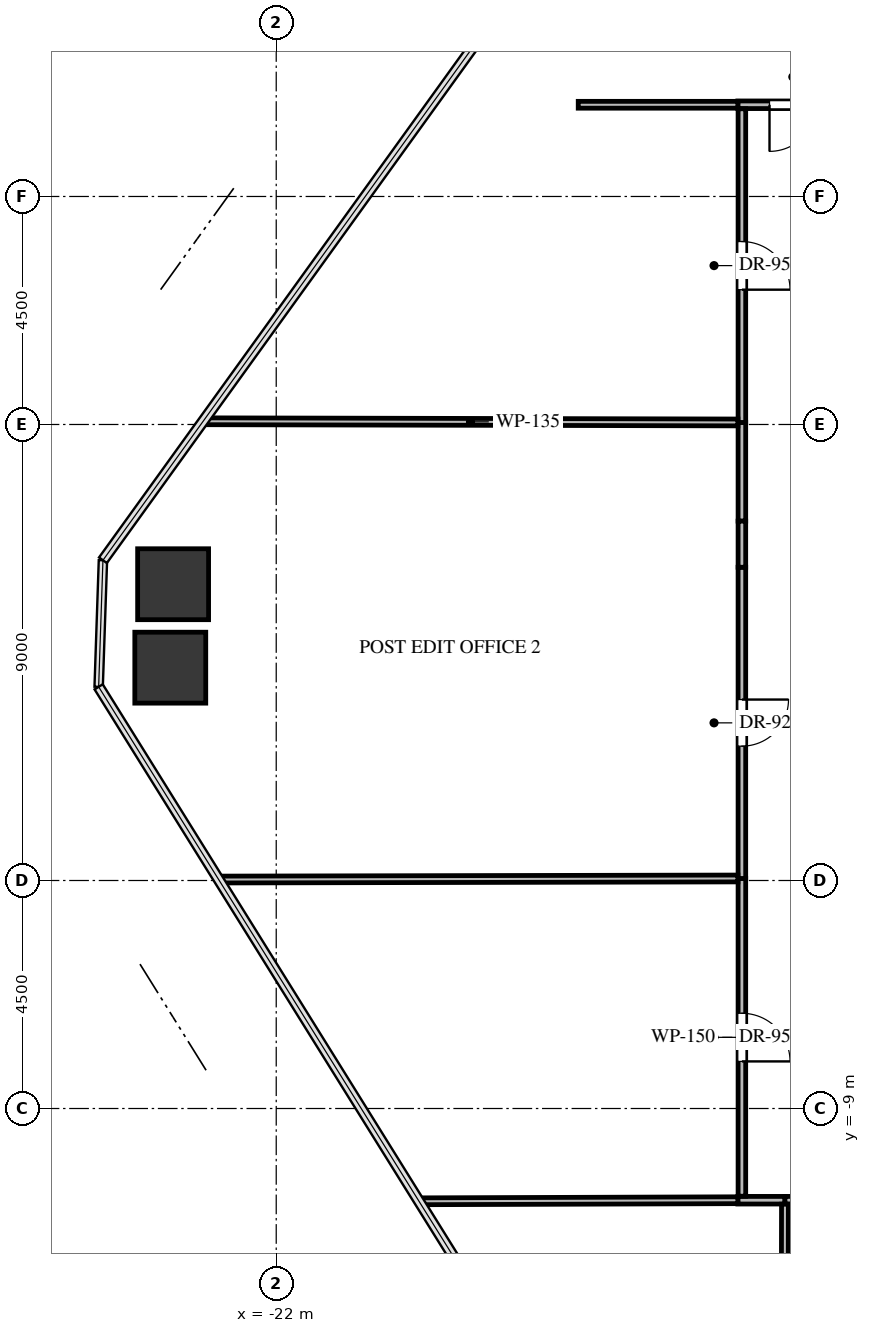
"""IFC4 building model, lengths in metres.
Left out: names, types, materials, properties, quantities, classifications, styles, units other than length and angle.
Written with IfcOpenShell. Run it as: python <this file> out.ifc"""

import sys

from ifc_helpers import new_model, si_unit, direction, frame, frame_2d, origin, origin_2d, place, context, subcontext, project, spatial, rectangle, extrude, source, transform, mapped, element, fill, save


model = new_model("IFC4")
c1 = context("Model", 3, precision=1e-05, world=origin(), true_north=direction((0.0, 1.0)))
c2 = subcontext(c1, "Body", "Model", "MODEL_VIEW")
j1 = project(units=[si_unit("LENGTHUNIT", "METRE"), si_unit("PLANEANGLEUNIT", "RADIAN")], contexts=[c1])
p1 = place(None, origin())
s1 = spatial("IfcSite", under=j1, at=p1, CompositionType="ELEMENT")
p2 = place(p1, origin())
s2 = spatial("IfcBuilding", under=s1, at=p2, CompositionType="ELEMENT")
p3 = place(p2, frame((0.0, 0.0, 72.0)))
s3 = spatial("IfcBuildingStorey", under=s2, at=p3, CompositionType="ELEMENT", Elevation=72.0)
m1 = source(origin(), c2, "Body", "SweptSolid", [
    extrude(rectangle(XDim=1.4, YDim=1.4, at=origin_2d()), origin(), (0.0, 0.0, 1.0), 3.3),
])
for number, where, z_axis, x_axis in (
    (1, (-24.091, -0.3, -0.24), (0.0, 0.0, 1.0), (1.0, 0.0, 0.0)),
    (2, (-24.035, 1.347, -0.24), (0.0, 0.0, 1.0), (1.0, 0.0, 0.0)),
):
    element("IfcColumn", number, at=place(p3, frame(where, z_axis=z_axis, x_axis=x_axis)), inside=s3, PredefinedType="COLUMN", context=c2, shape_type="MappedRepresentation", body=[
        mapped(m1, transform((0.0, 0.0, 0.0), x_axis=(1.0, 0.0, 0.0), y_axis=(0.0, 1.0, 0.0), z_axis=(0.0, 0.0, 1.0), scale=1.0)),
    ])
p4 = place(p3, frame((-10.72, 10.81, 0.0), z_axis=(0.0, 0.0, 1.0), x_axis=(-1.0, 0.0, 0.0)))
e3 = element("IfcWall", 3, at=p4, inside=s3, PredefinedType="PARTITIONING", context=c2, shape_type="SweptSolid", body=[
    extrude(rectangle(XDim=2.17, YDim=0.15, at=frame_2d((1.085, 0.0))), origin(), (0.0, 0.0, 1.0), 3.045),
])
p5 = place(p4, frame((0.625, 0.0, 0.0)))
e4 = element("IfcOpeningElement", 4, at=p5, cuts=e3, PredefinedType="OPENING", context=c2, shape_type="SweptSolid", body=[
    extrude(rectangle(XDim=0.92, YDim=2.1, at=frame_2d((0.46, 1.05))), frame((0.0, 0.085, 0.0), z_axis=(0.0, -1.0, 0.0), x_axis=(1.0, 0.0, 0.0)), (0.0, 0.0, 1.0), 0.17),
])
p6 = place(p3, frame((-12.89, -10.81, 0.0), z_axis=(0.0, 0.0, 1.0), x_axis=(1.0, 0.0, 0.0)))
e5 = element("IfcWall", 5, at=p6, inside=s3, PredefinedType="PARTITIONING", context=c2, shape_type="SweptSolid", body=[
    extrude(rectangle(XDim=0.93, YDim=0.15, at=frame_2d((0.465, 0.0))), origin(), (0.0, 0.0, 1.0), 3.045),
])
p7 = place(p3, frame((-11.96, -10.81, 0.0), z_axis=(0.0, 0.0, 1.0), x_axis=(1.0, 0.0, 0.0)))
e6 = element("IfcWall", 6, at=p7, inside=s3, PredefinedType="PARTITIONING", context=c2, shape_type="SweptSolid", body=[
    extrude(rectangle(XDim=5.838, YDim=0.15, at=frame_2d((2.919, 0.0))), origin(), (0.0, 0.0, 1.0), 2.13),
])
p8 = place(p3, frame((-12.81, -4.46, 0.0), z_axis=(0.0, 0.0, 1.0), x_axis=(0.0, -1.0, 0.0)))
e7 = element("IfcWall", 7, at=p8, inside=s3, PredefinedType="PARTITIONING", context=c2, shape_type="SweptSolid", body=[
    extrude(rectangle(XDim=6.271, YDim=0.15, at=frame_2d((3.135, 0.0))), origin(), (0.0, 0.0, 1.0), 3.045),
])
p9 = place(p8, frame((2.66, 0.0, 0.0)))
e8 = element("IfcOpeningElement", 8, at=p9, cuts=e7, PredefinedType="OPENING", context=c2, shape_type="SweptSolid", body=[
    extrude(rectangle(XDim=0.95, YDim=2.1, at=frame_2d((0.475, 1.05))), frame((0.0, 0.085, 0.0), z_axis=(0.0, -1.0, 0.0), x_axis=(1.0, 0.0, 0.0)), (0.0, 0.0, 1.0), 0.17),
])
p10 = place(p3, frame((-12.81, 4.54, 0.0), z_axis=(0.0, 0.0, 1.0), x_axis=(0.0, -1.0, 0.0)))
e9 = element("IfcWall", 9, at=p10, inside=s3, PredefinedType="PARTITIONING", context=c2, shape_type="SweptSolid", body=[
    extrude(rectangle(XDim=1.948, YDim=0.15, at=frame_2d((0.974, 0.0))), origin(), (0.0, 0.0, 1.0), 3.045),
])
p11 = place(p3, frame((-12.81, 1.682, 0.0), z_axis=(0.0, 0.0, 1.0), x_axis=(0.0, -1.0, 0.0)))
e10 = element("IfcWall", 10, at=p11, inside=s3, PredefinedType="PARTITIONING", context=c2, shape_type="SweptSolid", body=[
    extrude(rectangle(XDim=6.142, YDim=0.15, at=frame_2d((3.071, 0.0))), origin(), (0.0, 0.0, 1.0), 3.045),
])
p12 = place(p11, frame((2.611, 0.0, 0.0)))
e11 = element("IfcOpeningElement", 11, at=p12, cuts=e10, PredefinedType="OPENING", context=c2, shape_type="SweptSolid", body=[
    extrude(rectangle(XDim=0.92, YDim=2.1, at=frame_2d((0.46, 1.05))), frame((0.0, 0.085, 0.0), z_axis=(0.0, -1.0, 0.0), x_axis=(1.0, 0.0, 0.0)), (0.0, 0.0, 1.0), 0.17),
])
p13 = place(p3, frame((-12.81, 2.592, 0.0), z_axis=(0.0, 0.0, 1.0), x_axis=(0.0, -1.0, 0.0)))
e12 = element("IfcWall", 12, at=p13, inside=s3, PredefinedType="PARTITIONING", context=c2, shape_type="SweptSolid", body=[
    extrude(rectangle(XDim=0.91, YDim=0.15, at=frame_2d((0.455, 0.0))), origin(), (0.0, 0.0, 1.0), 2.13),
])
p14 = place(p3, frame((-12.81, 10.731, 0.0), z_axis=(0.0, 0.0, 1.0), x_axis=(0.0, -1.0, 0.0)))
e13 = element("IfcWall", 13, at=p14, inside=s3, PredefinedType="PARTITIONING", context=c2, shape_type="SweptSolid", body=[
    extrude(rectangle(XDim=6.191, YDim=0.15, at=frame_2d((3.095, 0.0))), origin(), (0.0, 0.0, 1.0), 3.045),
])
p15 = place(p14, frame((2.621, 0.0, 0.0)))
e14 = element("IfcOpeningElement", 14, at=p15, cuts=e13, PredefinedType="OPENING", context=c2, shape_type="SweptSolid", body=[
    extrude(rectangle(XDim=0.95, YDim=2.1, at=frame_2d((0.475, 1.05))), frame((0.0, 0.085, 0.0), z_axis=(0.0, -1.0, 0.0), x_axis=(1.0, 0.0, 0.0)), (0.0, 0.0, 1.0), 0.17),
])
p16 = place(p3, frame((-12.89, 10.81, 0.0), z_axis=(0.0, 0.0, 1.0), x_axis=(-1.0, 0.0, 0.0)))
e15 = element("IfcWall", 15, at=p16, inside=s3, PredefinedType="PARTITIONING", context=c2, shape_type="SweptSolid", body=[
    extrude(rectangle(XDim=3.15, YDim=0.135, at=frame_2d((1.575, 0.0))), origin(), (0.0, 0.0, 1.0), 3.045),
])
p17 = place(p3, frame((-11.96, -10.889, 0.0), z_axis=(0.0, 0.0, 1.0), x_axis=(-0.002018838416, -0.999997962144, 0.0)))
e16 = element("IfcWall", 16, at=p17, inside=s3, PredefinedType="PARTITIONING", context=c2, shape_type="SweptSolid", body=[
    extrude(rectangle(XDim=5.805, YDim=0.135, at=frame_2d((2.902, 0.0))), origin(), (0.0, 0.0, 1.0), 2.13),
])
p18 = place(p17, frame((2.452, 0.0, 0.0)))
e17 = element("IfcOpeningElement", 17, at=p18, cuts=e16, PredefinedType="OPENING", context=c2, shape_type="SweptSolid", body=[
    extrude(rectangle(XDim=0.9, YDim=2.05, at=frame_2d((0.45, 1.025))), frame((0.0, 0.078, 0.0), z_axis=(0.0, -1.0, 0.0), x_axis=(1.0, 0.0, 0.0)), (0.0, 0.0, 1.0), 0.155),
])
p19 = place(p3, frame((-19.182, -10.831, 0.0), z_axis=(0.0, 0.0, 1.0), x_axis=(0.999994432845, 0.003336806783, 0.0)))
e18 = element("IfcWall", 18, at=p19, inside=s3, PredefinedType="PARTITIONING", context=c2, shape_type="SweptSolid", body=[
    extrude(rectangle(XDim=6.292, YDim=0.135, at=frame_2d((3.146, 0.0))), origin(), (0.0, 0.0, 1.0), 2.38),
])
p20 = place(p3, frame((-23.136, -4.481, 0.0), z_axis=(0.0, 0.0, 1.0), x_axis=(0.999997900937, 0.00204893192, 0.0)))
e19 = element("IfcWall", 19, at=p20, inside=s3, PredefinedType="PARTITIONING", context=c2, shape_type="SweptSolid", body=[
    extrude(rectangle(XDim=10.247, YDim=0.135, at=frame_2d((5.124, 0.0))), origin(), (0.0, 0.0, 1.0), 2.38),
])
p21 = place(p3, frame((-23.442, 4.563, 0.0), z_axis=(0.0, 0.0, 1.0), x_axis=(0.999997585065, -0.002197695204, 0.0)))
e20 = element("IfcWall", 20, at=p21, inside=s3, PredefinedType="PARTITIONING", context=c2, shape_type="SweptSolid", body=[
    extrude(rectangle(XDim=10.553, YDim=0.135, at=frame_2d((5.277, 0.0))), origin(), (0.0, 0.0, 1.0), 2.38),
])
m2 = source(origin(), c2, "Body", "SweptSolid", [
    extrude(rectangle(XDim=0.92, YDim=2.1, at=frame_2d((0.46, 1.05))), frame((0.0, 0.025, 0.0), z_axis=(0.0, -1.0, 0.0), x_axis=(1.0, 0.0, 0.0)), (0.0, 0.0, 1.0), 0.05),
])
p22 = place(p5, origin())
e21 = element("IfcDoor", 21, at=p22, inside=s3, OperationType="SINGLE_SWING_RIGHT", PredefinedType="DOOR", context=c2, shape_type="MappedRepresentation", body=[
    mapped(m2, transform((0.0, 0.0, 0.0), x_axis=(1.0, 0.0, 0.0), y_axis=(0.0, 1.0, 0.0), z_axis=(0.0, 0.0, 1.0), scale=1.0)),
])
fill(e4, e21)
m3 = source(origin(), c2, "Body", "SweptSolid", [
    extrude(rectangle(XDim=0.95, YDim=2.1, at=frame_2d((0.475, 1.05))), frame((0.0, 0.025, 0.0), z_axis=(0.0, -1.0, 0.0), x_axis=(1.0, 0.0, 0.0)), (0.0, 0.0, 1.0), 0.05),
])
p23 = place(p9, origin())
e22 = element("IfcDoor", 22, at=p23, inside=s3, OperationType="SINGLE_SWING_RIGHT", PredefinedType="DOOR", context=c2, shape_type="MappedRepresentation", body=[
    mapped(m3, transform((0.0, 0.0, 0.0), x_axis=(1.0, 0.0, 0.0), y_axis=(0.0, 1.0, 0.0), z_axis=(0.0, 0.0, 1.0), scale=1.0)),
])
fill(e8, e22)
m4 = source(origin(), c2, "Body", "SweptSolid", [
    extrude(rectangle(XDim=0.92, YDim=2.1, at=frame_2d((0.46, 1.05))), frame((0.0, 0.025, 0.0), z_axis=(0.0, -1.0, 0.0), x_axis=(1.0, 0.0, 0.0)), (0.0, 0.0, 1.0), 0.05),
])
p24 = place(p12, origin())
e23 = element("IfcDoor", 23, at=p24, inside=s3, OperationType="SINGLE_SWING_LEFT", PredefinedType="DOOR", context=c2, shape_type="MappedRepresentation", body=[
    mapped(m4, transform((0.0, 0.0, 0.0), x_axis=(1.0, 0.0, 0.0), y_axis=(0.0, 1.0, 0.0), z_axis=(0.0, 0.0, 1.0), scale=1.0)),
])
fill(e11, e23)
p25 = place(p15, origin())
e24 = element("IfcDoor", 24, at=p25, inside=s3, OperationType="SINGLE_SWING_RIGHT", PredefinedType="DOOR", context=c2, shape_type="MappedRepresentation", body=[
    mapped(m3, transform((0.0, 0.0, 0.0), x_axis=(1.0, 0.0, 0.0), y_axis=(0.0, 1.0, 0.0), z_axis=(0.0, 0.0, 1.0), scale=1.0)),
])
fill(e14, e24)
save(model, sys.argv[1])
